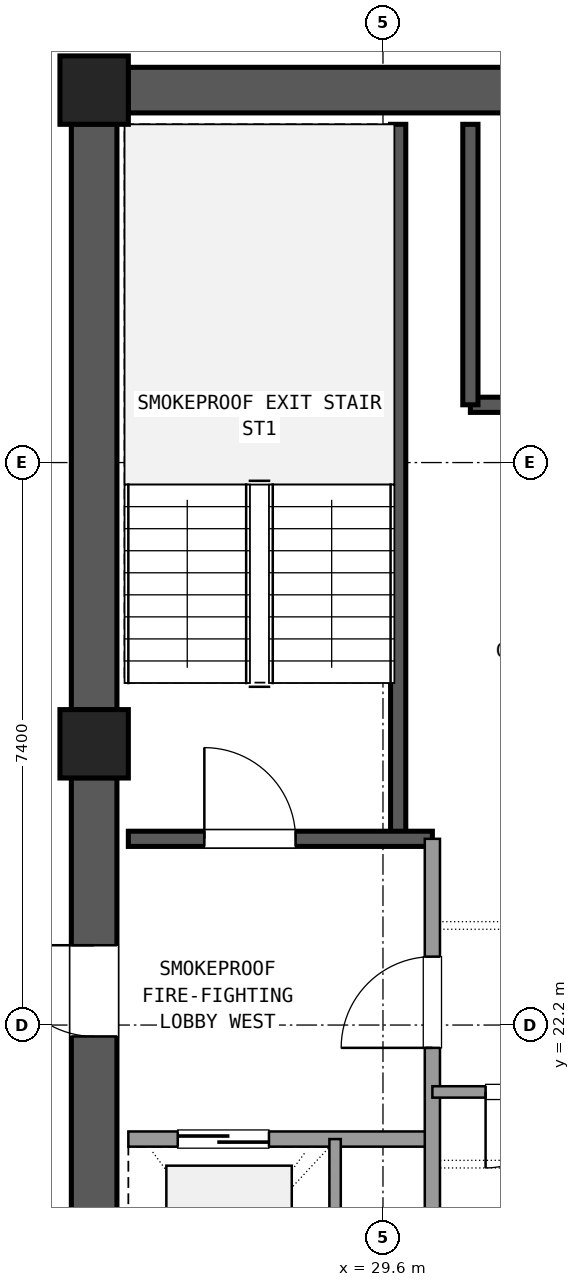
"""IFC4 building model, lengths in metres.
Left out: names, types, materials, properties, quantities, classifications, styles, units other than length and angle.
Written with IfcOpenShell. Run it as: python <this file> out.ifc"""

import sys

from ifc_helpers import new_model, si_unit, direction, frame, frame_2d, origin, origin_2d, place, context, subcontext, project, spatial, rectangle, extrude, element, fill, save


model = new_model("IFC4")
c1 = context("Model", 3, precision=1e-05, world=origin(), true_north=direction((0.0, 1.0)))
c2 = subcontext(c1, "Body", "Model", "MODEL_VIEW")
j1 = project(units=[si_unit("LENGTHUNIT", "METRE"), si_unit("PLANEANGLEUNIT", "RADIAN")], contexts=[c1])
p1 = place(None, origin())
s1 = spatial("IfcSite", under=j1, at=p1, CompositionType="ELEMENT")
p2 = place(p1, origin())
s2 = spatial("IfcBuilding", under=s1, at=p2, CompositionType="ELEMENT")
p3 = place(p2, frame((0.0, 0.0, 196.38)))
s3 = spatial("IfcBuildingStorey", under=s2, at=p3, CompositionType="ELEMENT", Elevation=196.38)
for number, where, z_axis, x_axis in (
    (1, (25.8, 34.5, 0.0), (0.0, 0.0, 1.0), (1.0, 0.0, 0.0)),
    (2, (25.8, 25.9, 0.0), (0.0, 0.0, 1.0), (1.0, 0.0, 0.0)),
):
    element("IfcColumn", number, at=place(p3, frame(where, z_axis=z_axis, x_axis=x_axis)), inside=s3, PredefinedType="COLUMN", context=c2, shape_type="SweptSolid", body=[
        extrude(rectangle(XDim=0.9, YDim=0.9, at=origin_2d()), origin(), (0.0, 0.0, 1.0), 3.6),
    ])
p4 = place(p3, frame((36.555, 34.5, 0.0), z_axis=(0.0, 0.0, 1.0), x_axis=(-1.0, 0.0, 0.0)))
e3 = element("IfcWall", 3, at=p4, inside=s3, PredefinedType="SHEAR", context=c2, shape_type="SweptSolid", body=[
    extrude(rectangle(XDim=10.31, YDim=0.6, at=frame_2d((5.155, 0.0))), origin(), (0.0, 0.0, 1.0), 3.32),
])
p5 = place(p4, frame((4.155, 0.0, 0.0)))
e4 = element("IfcOpeningElement", 4, at=p5, cuts=e3, PredefinedType="OPENING", context=c2, shape_type="SweptSolid", body=[
    extrude(rectangle(XDim=1.2, YDim=2.15, at=frame_2d((0.6, 1.075))), frame((0.0, 0.31, 0.0), z_axis=(0.0, -1.0, 0.0), x_axis=(1.0, 0.0, 0.0)), (0.0, 0.0, 1.0), 0.62),
])
p6 = place(p3, frame((25.8, 34.055, 0.0), z_axis=(0.0, 0.0, 1.0), x_axis=(0.0, -1.0, 0.0)))
e5 = element("IfcWall", 5, at=p6, inside=s3, PredefinedType="SHEAR", context=c2, shape_type="SweptSolid", body=[
    extrude(rectangle(XDim=7.71, YDim=0.6, at=frame_2d((3.855, 0.0))), origin(), (0.0, 0.0, 1.0), 3.32),
])
p7 = place(p3, frame((25.8, 25.455, 0.0), z_axis=(0.0, 0.0, 1.0), x_axis=(0.0, -1.0, 0.0)))
e6 = element("IfcWall", 6, at=p7, inside=s3, PredefinedType="SHEAR", context=c2, shape_type="SweptSolid", body=[
    extrude(rectangle(XDim=7.71, YDim=0.6, at=frame_2d((3.855, 0.0))), origin(), (0.0, 0.0, 1.0), 3.32),
])
p8 = place(p7, frame((2.205, 0.0, 0.0)))
e7 = element("IfcOpeningElement", 7, at=p8, cuts=e6, PredefinedType="OPENING", context=c2, shape_type="SweptSolid", body=[
    extrude(rectangle(XDim=1.2, YDim=2.15, at=frame_2d((0.6, 1.075))), frame((0.0, 0.31, 0.0), z_axis=(0.0, -1.0, 0.0), x_axis=(1.0, 0.0, 0.0)), (0.0, 0.0, 1.0), 0.62),
])
p9 = place(p3, frame((29.8, 24.65, 0.0), z_axis=(0.0, 0.0, 1.0), x_axis=(0.0, 1.0, 0.0)))
e8 = element("IfcWall", 8, at=p9, inside=s3, PredefinedType="SHEAR", context=c2, shape_type="SweptSolid", body=[
    extrude(rectangle(XDim=9.4, YDim=0.2, at=frame_2d((4.7, 0.0))), origin(), (0.0, 0.0, 1.0), 3.32),
])
p10 = place(p3, frame((26.25, 24.65, 0.0), z_axis=(0.0, 0.0, 1.0), x_axis=(1.0, 0.0, 0.0)))
e9 = element("IfcWall", 9, at=p10, inside=s3, PredefinedType="SHEAR", context=c2, shape_type="SweptSolid", body=[
    extrude(rectangle(XDim=4.0, YDim=0.2, at=frame_2d((2.0, 0.0))), origin(), (0.0, 0.0, 1.0), 3.32),
])
p11 = place(p10, frame((1.0, 0.0, 0.0)))
e10 = element("IfcOpeningElement", 10, at=p11, cuts=e9, PredefinedType="OPENING", context=c2, shape_type="SweptSolid", body=[
    extrude(rectangle(XDim=1.2, YDim=2.15, at=frame_2d((0.6, 1.075))), frame((0.0, 0.11, 0.0), z_axis=(0.0, -1.0, 0.0), x_axis=(1.0, 0.0, 0.0)), (0.0, 0.0, 1.0), 0.22),
])
p12 = place(p3, frame((30.75, 30.36, 0.0), z_axis=(0.0, 0.0, 1.0), x_axis=(1.0, 0.0, 0.0)))
e11 = element("IfcWall", 11, at=p12, inside=s3, PredefinedType="SHEAR", context=c2, shape_type="SweptSolid", body=[
    extrude(rectangle(XDim=9.5, YDim=0.2, at=frame_2d((4.75, 0.0))), origin(), (0.0, 0.0, 1.0), 3.32),
])
p13 = place(p3, frame((30.75, 30.36, 0.0), z_axis=(0.0, 0.0, 1.0), x_axis=(0.0, 1.0, 0.0)))
e12 = element("IfcWall", 12, at=p13, inside=s3, PredefinedType="SHEAR", context=c2, shape_type="SweptSolid", body=[
    extrude(rectangle(XDim=3.69, YDim=0.2, at=frame_2d((1.845, 0.0))), origin(), (0.0, 0.0, 1.0), 3.32),
])
p14 = place(p3, frame((26.25, 20.7, 0.0), z_axis=(0.0, 0.0, 1.0), x_axis=(1.0, 0.0, 0.0)))
e13 = element("IfcWall", 13, at=p14, inside=s3, PredefinedType="SOLIDWALL", context=c2, shape_type="SweptSolid", body=[
    extrude(rectangle(XDim=4.0, YDim=0.2, at=frame_2d((2.0, 0.0))), origin(), (0.0, 0.0, 1.0), 2.61),
])
p15 = place(p14, frame((0.65, 0.0, 0.0)))
e14 = element("IfcOpeningElement", 14, at=p15, cuts=e13, PredefinedType="OPENING", context=c2, shape_type="SweptSolid", body=[
    extrude(rectangle(XDim=1.2, YDim=2.15, at=frame_2d((0.6, 1.075))), frame((0.0, 0.11, 0.0), z_axis=(0.0, -1.0, 0.0), x_axis=(1.0, 0.0, 0.0)), (0.0, 0.0, 1.0), 0.22),
])
p16 = place(p3, frame((30.25, 17.75, 0.0), z_axis=(0.0, 0.0, 1.0), x_axis=(0.0, 1.0, 0.0)))
e15 = element("IfcWall", 15, at=p16, inside=s3, PredefinedType="SOLIDWALL", context=c2, shape_type="SweptSolid", body=[
    extrude(rectangle(XDim=6.9, YDim=0.2, at=frame_2d((3.45, 0.0))), origin(), (0.0, 0.0, 1.0), 2.61),
])
p17 = place(p16, frame((4.15, 0.0, 0.0)))
e16 = element("IfcOpeningElement", 16, at=p17, cuts=e15, PredefinedType="OPENING", context=c2, shape_type="SweptSolid", body=[
    extrude(rectangle(XDim=1.2, YDim=2.15, at=frame_2d((0.6, 1.075))), frame((0.0, 0.11, 0.0), z_axis=(0.0, -1.0, 0.0), x_axis=(1.0, 0.0, 0.0)), (0.0, 0.0, 1.0), 0.22),
])
p18 = place(p3, frame((28.97, 17.75, 0.0), z_axis=(0.0, 0.0, 1.0), x_axis=(0.0, 1.0, 0.0)))
e17 = element("IfcWall", 17, at=p18, inside=s3, PredefinedType="PARTITIONING", context=c2, shape_type="SweptSolid", body=[
    extrude(rectangle(XDim=2.95, YDim=0.15, at=frame_2d((1.475, 0.0))), origin(), (0.0, 0.0, 1.0), 2.61),
])
p19 = place(p3, frame((30.25, 21.32, 0.0), z_axis=(0.0, 0.0, 1.0), x_axis=(1.0, 0.0, 0.0)))
e18 = element("IfcWall", 18, at=p19, inside=s3, PredefinedType="PARTITIONING", context=c2, shape_type="SweptSolid", body=[
    extrude(rectangle(XDim=7.0, YDim=0.15, at=frame_2d((3.5, 0.0))), origin(), (0.0, 0.0, 1.0), 2.61),
])
p20 = place(p19, frame((0.7, 0.0, 0.0)))
e19 = element("IfcOpeningElement", 19, at=p20, cuts=e18, PredefinedType="OPENING", context=c2, shape_type="SweptSolid", body=[
    extrude(rectangle(XDim=1.0, YDim=2.15, at=frame_2d((0.5, 1.075))), frame((0.0, 0.085, 0.0), z_axis=(0.0, -1.0, 0.0), x_axis=(1.0, 0.0, 0.0)), (0.0, 0.0, 1.0), 0.17),
])
p21 = place(p19, frame((5.5, 0.0, 0.0)))
e20 = element("IfcOpeningElement", 20, at=p21, cuts=e18, PredefinedType="OPENING", context=c2, shape_type="SweptSolid", body=[
    extrude(rectangle(XDim=1.0, YDim=2.15, at=frame_2d((0.5, 1.075))), frame((0.0, 0.085, 0.0), z_axis=(0.0, -1.0, 0.0), x_axis=(1.0, 0.0, 0.0)), (0.0, 0.0, 1.0), 0.17),
])
p22 = place(p11, origin())
e21 = element("IfcDoor", 21, at=p22, inside=s3, OperationType="SINGLE_SWING_LEFT", PredefinedType="DOOR", context=c2, shape_type="SweptSolid", body=[
    extrude(rectangle(XDim=1.2, YDim=2.15, at=frame_2d((0.6, 1.075))), frame((0.0, 0.025, 0.0), z_axis=(0.0, -1.0, 0.0), x_axis=(1.0, 0.0, 0.0)), (0.0, 0.0, 1.0), 0.05),
])
fill(e10, e21)
p23 = place(p15, origin())
e22 = element("IfcDoor", 22, at=p23, inside=s3, OperationType="SLIDING_TO_LEFT", PredefinedType="DOOR", context=c2, shape_type="SweptSolid", body=[
    extrude(rectangle(XDim=1.2, YDim=2.15, at=frame_2d((0.6, 1.075))), frame((0.0, 0.025, 0.0), z_axis=(0.0, -1.0, 0.0), x_axis=(1.0, 0.0, 0.0)), (0.0, 0.0, 1.0), 0.05),
])
fill(e14, e22)
p24 = place(p17, origin())
e23 = element("IfcDoor", 23, at=p24, inside=s3, OperationType="SINGLE_SWING_LEFT", PredefinedType="DOOR", context=c2, shape_type="SweptSolid", body=[
    extrude(rectangle(XDim=1.2, YDim=2.15, at=frame_2d((0.6, 1.075))), frame((0.0, 0.025, 0.0), z_axis=(0.0, -1.0, 0.0), x_axis=(1.0, 0.0, 0.0)), (0.0, 0.0, 1.0), 0.05),
])
fill(e16, e23)
p25 = place(p8, frame((1.2, 0.0, 0.0), z_axis=(0.0, 0.0, 1.0), x_axis=(-1.0, 0.0, 0.0)))
e24 = element("IfcDoor", 24, at=p25, inside=s3, OperationType="SINGLE_SWING_LEFT", PredefinedType="DOOR", context=c2, shape_type="SweptSolid", body=[
    extrude(rectangle(XDim=1.2, YDim=2.15, at=frame_2d((0.6, 1.075))), frame((0.0, 0.025, 0.0), z_axis=(0.0, -1.0, 0.0), x_axis=(1.0, 0.0, 0.0)), (0.0, 0.0, 1.0), 0.05),
])
fill(e7, e24)
p26 = place(p20, frame((1.0, 0.0, 0.0), z_axis=(0.0, 0.0, 1.0), x_axis=(-1.0, 0.0, 0.0)))
e25 = element("IfcDoor", 25, at=p26, inside=s3, OperationType="SINGLE_SWING_LEFT", PredefinedType="DOOR", context=c2, shape_type="SweptSolid", body=[
    extrude(rectangle(XDim=1.0, YDim=2.15, at=frame_2d((0.5, 1.075))), frame((0.0, 0.025, 0.0), z_axis=(0.0, -1.0, 0.0), x_axis=(1.0, 0.0, 0.0)), (0.0, 0.0, 1.0), 0.05),
])
fill(e19, e25)
save(model, sys.argv[1])
